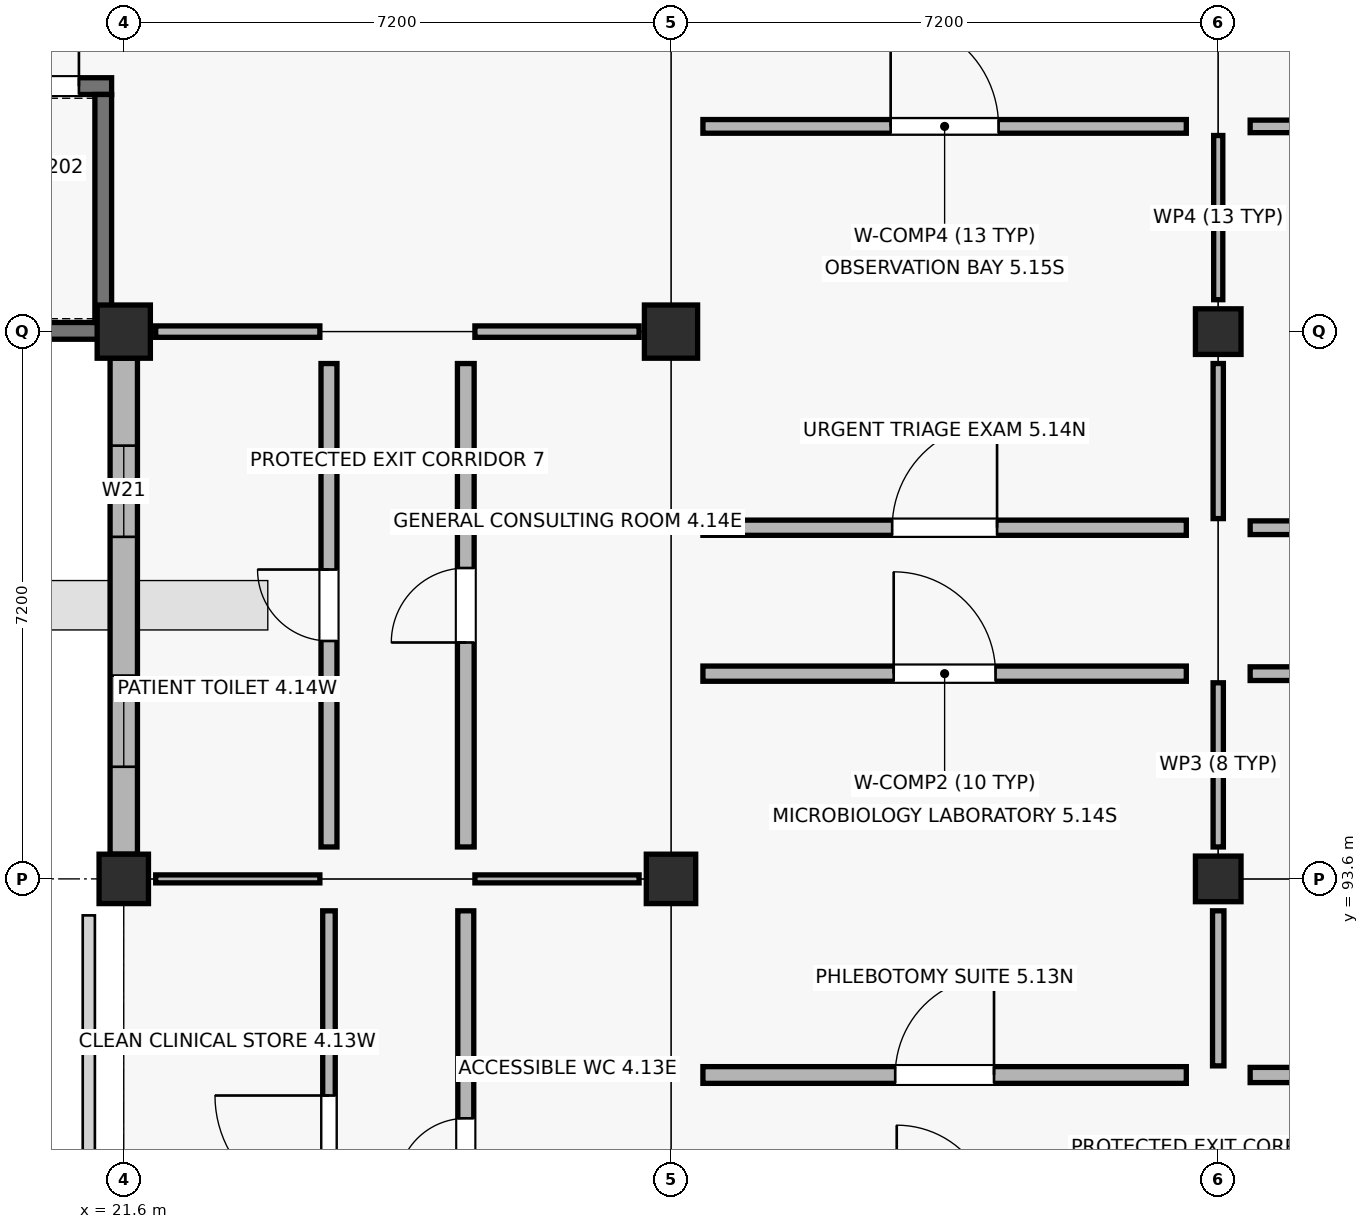
"""IFC4 building model, lengths in metres.
Left out: names, types, materials, properties, quantities, classifications, styles, units other than length and angle.
Written with IfcOpenShell. Run it as: python <this file> out.ifc"""

import sys

from ifc_helpers import new_model, si_unit, direction, frame, frame_2d, origin, origin_2d, place, context, subcontext, project, spatial, rectangle, extrude, element, fill, save


model = new_model("IFC4")
c1 = context("Model", 3, precision=1e-05, world=origin(), true_north=direction((0.0, 1.0)))
c2 = subcontext(c1, "Body", "Model", "MODEL_VIEW")
j1 = project(units=[si_unit("LENGTHUNIT", "METRE"), si_unit("PLANEANGLEUNIT", "RADIAN")], contexts=[c1])
p1 = place(None, origin())
s1 = spatial("IfcSite", under=j1, at=p1, CompositionType="ELEMENT")
p2 = place(p1, origin())
s2 = spatial("IfcBuilding", under=s1, at=p2, CompositionType="ELEMENT")
p3 = place(p2, origin())
s3 = spatial("IfcBuildingStorey", under=s2, at=p3, CompositionType="ELEMENT", Elevation=0.0)
p4 = place(p3, frame((21.6, 93.6, -0.25), z_axis=(0.0, 0.0, 1.0), x_axis=(1.0, 0.0, 0.0)))
e1 = element("IfcColumn", 1, at=p4, inside=s3, PredefinedType="COLUMN", context=c2, shape_type="SweptSolid", body=[
    extrude(rectangle(XDim=0.65, YDim=0.65, at=origin_2d()), origin(), (0.0, 0.0, 1.0), 4.75),
])
p5 = place(p3, frame((21.6, 100.8, -0.25), z_axis=(0.0, 0.0, 1.0), x_axis=(1.0, 0.0, 0.0)))
e2 = element("IfcColumn", 2, at=p5, inside=s3, PredefinedType="COLUMN", context=c2, shape_type="SweptSolid", body=[
    extrude(rectangle(XDim=0.7, YDim=0.7, at=origin_2d()), origin(), (0.0, 0.0, 1.0), 4.75),
])
p6 = place(p3, frame((28.8, 93.6, -0.25), z_axis=(0.0, 0.0, 1.0), x_axis=(1.0, 0.0, 0.0)))
e3 = element("IfcColumn", 3, at=p6, inside=s3, PredefinedType="COLUMN", context=c2, shape_type="SweptSolid", body=[
    extrude(rectangle(XDim=0.65, YDim=0.65, at=origin_2d()), origin(), (0.0, 0.0, 1.0), 4.75),
])
p7 = place(p3, frame((28.8, 100.8, -0.25), z_axis=(0.0, 0.0, 1.0), x_axis=(1.0, 0.0, 0.0)))
e4 = element("IfcColumn", 4, at=p7, inside=s3, PredefinedType="COLUMN", context=c2, shape_type="SweptSolid", body=[
    extrude(rectangle(XDim=0.7, YDim=0.7, at=origin_2d()), origin(), (0.0, 0.0, 1.0), 4.75),
])
for number, where, z_axis, x_axis in (
    (5, (36.0, 93.6, -0.25), (0.0, 0.0, 1.0), (1.0, 0.0, 0.0)),
    (6, (36.0, 100.8, -0.25), (0.0, 0.0, 1.0), (1.0, 0.0, 0.0)),
):
    element("IfcColumn", number, at=place(p3, frame(where, z_axis=z_axis, x_axis=x_axis)), inside=s3, PredefinedType="COLUMN", context=c2, shape_type="SweptSolid", body=[
        extrude(rectangle(XDim=0.6, YDim=0.6, at=origin_2d()), origin(), (0.0, 0.0, 1.0), 4.75),
    ])
p8 = place(p3, frame((21.6, 100.45, 0.0), z_axis=(0.0, 0.0, 1.0), x_axis=(0.0, -1.0, 0.0)))
e7 = element("IfcWall", 7, at=p8, inside=s3, PredefinedType="SOLIDWALL", context=c2, shape_type="SweptSolid", body=[
    extrude(rectangle(XDim=6.525, YDim=0.36, at=frame_2d((3.262, 0.0))), origin(), (0.0, 0.0, 1.0), 3.52),
])
p9 = place(p8, frame((1.15, 0.0, 0.9)))
e8 = element("IfcOpeningElement", 8, at=p9, cuts=e7, PredefinedType="OPENING", context=c2, shape_type="SweptSolid", body=[
    extrude(rectangle(XDim=1.2, YDim=1.5, at=frame_2d((0.6, 0.75))), frame((0.0, 0.19, 0.0), z_axis=(0.0, -1.0, 0.0), x_axis=(1.0, 0.0, 0.0)), (0.0, 0.0, 1.0), 0.38),
])
p10 = place(p8, frame((4.175, 0.0, 0.9)))
e9 = element("IfcOpeningElement", 9, at=p10, cuts=e7, PredefinedType="OPENING", context=c2, shape_type="SweptSolid", body=[
    extrude(rectangle(XDim=1.2, YDim=1.5, at=frame_2d((0.6, 0.75))), frame((0.0, 0.19, 0.0), z_axis=(0.0, -1.0, 0.0), x_axis=(1.0, 0.0, 0.0)), (0.0, 0.0, 1.0), 0.38),
])
p11 = place(p3, frame((14.56, 100.81, -0.25), z_axis=(0.0, 0.0, 1.0), x_axis=(1.0, 0.0, 0.0)))
e10 = element("IfcWall", 10, at=p11, inside=s3, PredefinedType="SHEAR", context=c2, shape_type="SweptSolid", body=[
    extrude(rectangle(XDim=6.88, YDim=0.22, at=frame_2d((3.44, 0.0))), origin(), (0.0, 0.0, 1.0), 4.47),
])
p12 = place(p3, frame((14.56, 104.03, -0.25), z_axis=(0.0, 0.0, 1.0), x_axis=(1.0, 0.0, 0.0)))
e11 = element("IfcWall", 11, at=p12, inside=s3, PredefinedType="SHEAR", context=c2, shape_type="SweptSolid", body=[
    extrude(rectangle(XDim=6.88, YDim=0.22, at=frame_2d((3.44, 0.0))), origin(), (0.0, 0.0, 1.0), 4.47),
])
p13 = place(p12, frame((5.25, 0.0, 0.25)))
e12 = element("IfcOpeningElement", 12, at=p13, cuts=e11, PredefinedType="OPENING", context=c2, shape_type="SweptSolid", body=[
    extrude(rectangle(XDim=1.2, YDim=2.15, at=frame_2d((0.6, 1.075))), frame((0.0, 0.12, 0.0), z_axis=(0.0, -1.0, 0.0), x_axis=(1.0, 0.0, 0.0)), (0.0, 0.0, 1.0), 0.24),
])
p14 = place(p3, frame((21.33, 100.92, -0.25), z_axis=(0.0, 0.0, 1.0), x_axis=(0.0, 1.0, 0.0)))
e13 = element("IfcWall", 13, at=p14, inside=s3, PredefinedType="SHEAR", context=c2, shape_type="SweptSolid", body=[
    extrude(rectangle(XDim=3.0, YDim=0.22, at=frame_2d((1.5, 0.0))), origin(), (0.0, 0.0, 1.0), 4.47),
])
p15 = place(p3, frame((29.22, 91.02, 0.0), z_axis=(0.0, 0.0, 1.0), x_axis=(1.0, 0.0, 0.0)))
e14 = element("IfcWall", 14, at=p15, inside=s3, PredefinedType="SOLIDWALL", context=c2, shape_type="SweptSolid", body=[
    extrude(rectangle(XDim=6.36, YDim=0.22, at=frame_2d((3.18, 0.0))), origin(), (0.0, 0.0, 1.0), 3.36),
])
p16 = place(p15, frame((2.53, 0.0, 0.0)))
e15 = element("IfcOpeningElement", 15, at=p16, cuts=e14, PredefinedType="OPENING", context=c2, shape_type="SweptSolid", body=[
    extrude(rectangle(XDim=1.3, YDim=2.09, at=frame_2d((0.65, 1.045))), frame((0.0, 0.12, 0.0), z_axis=(0.0, -1.0, 0.0), x_axis=(1.0, 0.0, 0.0)), (0.0, 0.0, 1.0), 0.24),
])
p17 = place(p3, frame((36.0, 91.14, 0.0), z_axis=(0.0, 0.0, 1.0), x_axis=(0.0, 1.0, 0.0)))
e16 = element("IfcWall", 16, at=p17, inside=s3, PredefinedType="PARTITIONING", context=c2, shape_type="SweptSolid", body=[
    extrude(rectangle(XDim=2.04, YDim=0.15, at=frame_2d((1.02, 0.0))), origin(), (0.0, 0.0, 1.0), 3.36),
])
p18 = place(p3, frame((29.22, 96.3, 0.0), z_axis=(0.0, 0.0, 1.0), x_axis=(1.0, 0.0, 0.0)))
e17 = element("IfcWall", 17, at=p18, inside=s3, PredefinedType="SOLIDWALL", context=c2, shape_type="SweptSolid", body=[
    extrude(rectangle(XDim=6.36, YDim=0.2, at=frame_2d((3.18, 0.0))), origin(), (0.0, 0.0, 1.0), 3.36),
])
p19 = place(p18, frame((2.51, 0.0, 0.0)))
e18 = element("IfcOpeningElement", 18, at=p19, cuts=e17, PredefinedType="OPENING", context=c2, shape_type="SweptSolid", body=[
    extrude(rectangle(XDim=1.34, YDim=2.09, at=frame_2d((0.67, 1.045))), frame((0.0, 0.11, 0.0), z_axis=(0.0, -1.0, 0.0), x_axis=(1.0, 0.0, 0.0)), (0.0, 0.0, 1.0), 0.22),
])
p20 = place(p3, frame((36.0, 94.02, 0.0), z_axis=(0.0, 0.0, 1.0), x_axis=(0.0, 1.0, 0.0)))
e19 = element("IfcWall", 19, at=p20, inside=s3, PredefinedType="PARTITIONING", context=c2, shape_type="SweptSolid", body=[
    extrude(rectangle(XDim=2.16, YDim=0.135, at=frame_2d((1.08, 0.0))), origin(), (0.0, 0.0, 1.0), 3.36),
])
p21 = place(p3, frame((29.22, 98.22, 0.0), z_axis=(0.0, 0.0, 1.0), x_axis=(1.0, 0.0, 0.0)))
e20 = element("IfcWall", 20, at=p21, inside=s3, PredefinedType="SOLIDWALL", context=c2, shape_type="SweptSolid", body=[
    extrude(rectangle(XDim=6.36, YDim=0.2, at=frame_2d((3.18, 0.0))), origin(), (0.0, 0.0, 1.0), 3.36),
])
p22 = place(p21, frame((2.49, 0.0, 0.0)))
e21 = element("IfcOpeningElement", 21, at=p22, cuts=e20, PredefinedType="OPENING", context=c2, shape_type="SweptSolid", body=[
    extrude(rectangle(XDim=1.38, YDim=2.09, at=frame_2d((0.69, 1.045))), frame((0.0, 0.11, 0.0), z_axis=(0.0, -1.0, 0.0), x_axis=(1.0, 0.0, 0.0)), (0.0, 0.0, 1.0), 0.22),
])
p23 = place(p3, frame((36.0, 98.34, 0.0), z_axis=(0.0, 0.0, 1.0), x_axis=(0.0, 1.0, 0.0)))
e22 = element("IfcWall", 22, at=p23, inside=s3, PredefinedType="PARTITIONING", context=c2, shape_type="SweptSolid", body=[
    extrude(rectangle(XDim=2.04, YDim=0.135, at=frame_2d((1.02, 0.0))), origin(), (0.0, 0.0, 1.0), 3.36),
])
p24 = place(p3, frame((29.22, 103.5, 0.0), z_axis=(0.0, 0.0, 1.0), x_axis=(1.0, 0.0, 0.0)))
e23 = element("IfcWall", 23, at=p24, inside=s3, PredefinedType="PARTITIONING", context=c2, shape_type="SweptSolid", body=[
    extrude(rectangle(XDim=6.36, YDim=0.18, at=frame_2d((3.18, 0.0))), origin(), (0.0, 0.0, 1.0), 3.36),
])
p25 = place(p24, frame((2.47, 0.0, 0.0)))
e24 = element("IfcOpeningElement", 24, at=p25, cuts=e23, PredefinedType="OPENING", context=c2, shape_type="SweptSolid", body=[
    extrude(rectangle(XDim=1.42, YDim=2.09, at=frame_2d((0.71, 1.045))), frame((0.0, 0.1, 0.0), z_axis=(0.0, -1.0, 0.0), x_axis=(1.0, 0.0, 0.0)), (0.0, 0.0, 1.0), 0.2),
])
p26 = place(p3, frame((36.0, 101.22, 0.0), z_axis=(0.0, 0.0, 1.0), x_axis=(0.0, 1.0, 0.0)))
e25 = element("IfcWall", 25, at=p26, inside=s3, PredefinedType="PARTITIONING", context=c2, shape_type="SweptSolid", body=[
    extrude(rectangle(XDim=2.16, YDim=0.12, at=frame_2d((1.08, 0.0))), origin(), (0.0, 0.0, 1.0), 3.36),
])
p27 = place(p3, frame((36.42, 91.02, 0.0), z_axis=(0.0, 0.0, 1.0), x_axis=(1.0, 0.0, 0.0)))
e26 = element("IfcWall", 26, at=p27, inside=s3, PredefinedType="SOLIDWALL", context=c2, shape_type="SweptSolid", body=[
    extrude(rectangle(XDim=6.36, YDim=0.2, at=frame_2d((3.18, 0.0))), origin(), (0.0, 0.0, 1.0), 3.36),
])
p28 = place(p27, frame((2.69, 0.0, 0.0)))
e27 = element("IfcOpeningElement", 27, at=p28, cuts=e26, PredefinedType="OPENING", context=c2, shape_type="SweptSolid", body=[
    extrude(rectangle(XDim=0.98, YDim=2.14, at=frame_2d((0.49, 1.07))), frame((0.0, 0.11, 0.0), z_axis=(0.0, -1.0, 0.0), x_axis=(1.0, 0.0, 0.0)), (0.0, 0.0, 1.0), 0.22),
])
p29 = place(p3, frame((36.42, 96.3, 0.0), z_axis=(0.0, 0.0, 1.0), x_axis=(1.0, 0.0, 0.0)))
e28 = element("IfcWall", 28, at=p29, inside=s3, PredefinedType="PARTITIONING", context=c2, shape_type="SweptSolid", body=[
    extrude(rectangle(XDim=6.36, YDim=0.18, at=frame_2d((3.18, 0.0))), origin(), (0.0, 0.0, 1.0), 3.36),
])
p30 = place(p29, frame((2.67, 0.0, 0.0)))
e29 = element("IfcOpeningElement", 29, at=p30, cuts=e28, PredefinedType="OPENING", context=c2, shape_type="SweptSolid", body=[
    extrude(rectangle(XDim=1.02, YDim=2.14, at=frame_2d((0.51, 1.07))), frame((0.0, 0.1, 0.0), z_axis=(0.0, -1.0, 0.0), x_axis=(1.0, 0.0, 0.0)), (0.0, 0.0, 1.0), 0.2),
])
p31 = place(p3, frame((36.42, 98.22, 0.0), z_axis=(0.0, 0.0, 1.0), x_axis=(1.0, 0.0, 0.0)))
e30 = element("IfcWall", 30, at=p31, inside=s3, PredefinedType="PARTITIONING", context=c2, shape_type="SweptSolid", body=[
    extrude(rectangle(XDim=6.36, YDim=0.18, at=frame_2d((3.18, 0.0))), origin(), (0.0, 0.0, 1.0), 3.36),
])
p32 = place(p31, frame((2.65, 0.0, 0.0)))
e31 = element("IfcOpeningElement", 31, at=p32, cuts=e30, PredefinedType="OPENING", context=c2, shape_type="SweptSolid", body=[
    extrude(rectangle(XDim=1.06, YDim=2.14, at=frame_2d((0.53, 1.07))), frame((0.0, 0.1, 0.0), z_axis=(0.0, -1.0, 0.0), x_axis=(1.0, 0.0, 0.0)), (0.0, 0.0, 1.0), 0.2),
])
p33 = place(p3, frame((36.42, 103.5, 0.0), z_axis=(0.0, 0.0, 1.0), x_axis=(1.0, 0.0, 0.0)))
e32 = element("IfcWall", 32, at=p33, inside=s3, PredefinedType="PARTITIONING", context=c2, shape_type="SweptSolid", body=[
    extrude(rectangle(XDim=6.36, YDim=0.165, at=frame_2d((3.18, 0.0))), origin(), (0.0, 0.0, 1.0), 3.36),
])
p34 = place(p33, frame((2.63, 0.0, 0.0)))
e33 = element("IfcOpeningElement", 33, at=p34, cuts=e32, PredefinedType="OPENING", context=c2, shape_type="SweptSolid", body=[
    extrude(rectangle(XDim=1.1, YDim=2.14, at=frame_2d((0.55, 1.07))), frame((0.0, 0.093, 0.0), z_axis=(0.0, -1.0, 0.0), x_axis=(1.0, 0.0, 0.0)), (0.0, 0.0, 1.0), 0.185),
])
p35 = place(p3, frame((24.3, 86.82, 0.0), z_axis=(0.0, 0.0, 1.0), x_axis=(0.0, 1.0, 0.0)))
e34 = element("IfcWall", 34, at=p35, inside=s3, PredefinedType="PARTITIONING", context=c2, shape_type="SweptSolid", body=[
    extrude(rectangle(XDim=6.36, YDim=0.165, at=frame_2d((3.18, 0.0))), origin(), (0.0, 0.0, 1.0), 3.36),
])
p36 = place(p35, frame((2.43, 0.0, 0.0)))
e35 = element("IfcOpeningElement", 35, at=p36, cuts=e34, PredefinedType="OPENING", context=c2, shape_type="SweptSolid", body=[
    extrude(rectangle(XDim=1.5, YDim=2.09, at=frame_2d((0.75, 1.045))), frame((0.0, 0.093, 0.0), z_axis=(0.0, -1.0, 0.0), x_axis=(1.0, 0.0, 0.0)), (0.0, 0.0, 1.0), 0.185),
])
p37 = place(p3, frame((22.02, 93.6, 0.0), z_axis=(0.0, 0.0, 1.0), x_axis=(1.0, 0.0, 0.0)))
e36 = element("IfcWall", 36, at=p37, inside=s3, PredefinedType="PARTITIONING", context=c2, shape_type="SweptSolid", body=[
    extrude(rectangle(XDim=2.16, YDim=0.105, at=frame_2d((1.08, 0.0))), origin(), (0.0, 0.0, 1.0), 3.36),
])
p38 = place(p3, frame((26.1, 86.82, 0.0), z_axis=(0.0, 0.0, 1.0), x_axis=(0.0, 1.0, 0.0)))
e37 = element("IfcWall", 37, at=p38, inside=s3, PredefinedType="PLUMBINGWALL", context=c2, shape_type="SweptSolid", body=[
    extrude(rectangle(XDim=6.36, YDim=0.21, at=frame_2d((3.18, 0.0))), origin(), (0.0, 0.0, 1.0), 3.36),
])
p39 = place(p38, frame((2.73, 0.0, 0.0)))
e38 = element("IfcOpeningElement", 38, at=p39, cuts=e37, PredefinedType="OPENING", context=c2, shape_type="SweptSolid", body=[
    extrude(rectangle(XDim=0.9, YDim=2.14, at=frame_2d((0.45, 1.07))), frame((0.0, 0.115, 0.0), z_axis=(0.0, -1.0, 0.0), x_axis=(1.0, 0.0, 0.0)), (0.0, 0.0, 1.0), 0.23),
])
p40 = place(p3, frame((26.22, 93.6, 0.0), z_axis=(0.0, 0.0, 1.0), x_axis=(1.0, 0.0, 0.0)))
e39 = element("IfcWall", 39, at=p40, inside=s3, PredefinedType="PARTITIONING", context=c2, shape_type="SweptSolid", body=[
    extrude(rectangle(XDim=2.16, YDim=0.105, at=frame_2d((1.08, 0.0))), origin(), (0.0, 0.0, 1.0), 3.36),
])
p41 = place(p3, frame((24.3, 94.02, 0.0), z_axis=(0.0, 0.0, 1.0), x_axis=(0.0, 1.0, 0.0)))
e40 = element("IfcWall", 40, at=p41, inside=s3, PredefinedType="PLUMBINGWALL", context=c2, shape_type="SweptSolid", body=[
    extrude(rectangle(XDim=6.36, YDim=0.21, at=frame_2d((3.18, 0.0))), origin(), (0.0, 0.0, 1.0), 3.36),
])
p42 = place(p41, frame((2.71, 0.0, 0.0)))
e41 = element("IfcOpeningElement", 41, at=p42, cuts=e40, PredefinedType="OPENING", context=c2, shape_type="SweptSolid", body=[
    extrude(rectangle(XDim=0.94, YDim=2.14, at=frame_2d((0.47, 1.07))), frame((0.0, 0.115, 0.0), z_axis=(0.0, -1.0, 0.0), x_axis=(1.0, 0.0, 0.0)), (0.0, 0.0, 1.0), 0.23),
])
p43 = place(p3, frame((22.02, 100.8, 0.0), z_axis=(0.0, 0.0, 1.0), x_axis=(1.0, 0.0, 0.0)))
e42 = element("IfcWall", 42, at=p43, inside=s3, PredefinedType="PARTITIONING", context=c2, shape_type="SweptSolid", body=[
    extrude(rectangle(XDim=2.16, YDim=0.15, at=frame_2d((1.08, 0.0))), origin(), (0.0, 0.0, 1.0), 3.36),
])
p44 = place(p3, frame((26.1, 94.02, 0.0), z_axis=(0.0, 0.0, 1.0), x_axis=(0.0, 1.0, 0.0)))
e43 = element("IfcWall", 43, at=p44, inside=s3, PredefinedType="SOLIDWALL", context=c2, shape_type="SweptSolid", body=[
    extrude(rectangle(XDim=6.36, YDim=0.22, at=frame_2d((3.18, 0.0))), origin(), (0.0, 0.0, 1.0), 3.36),
])
p45 = place(p44, frame((2.69, 0.0, 0.0)))
e44 = element("IfcOpeningElement", 44, at=p45, cuts=e43, PredefinedType="OPENING", context=c2, shape_type="SweptSolid", body=[
    extrude(rectangle(XDim=0.98, YDim=2.14, at=frame_2d((0.49, 1.07))), frame((0.0, 0.12, 0.0), z_axis=(0.0, -1.0, 0.0), x_axis=(1.0, 0.0, 0.0)), (0.0, 0.0, 1.0), 0.24),
])
p46 = place(p3, frame((26.22, 100.8, 0.0), z_axis=(0.0, 0.0, 1.0), x_axis=(1.0, 0.0, 0.0)))
e45 = element("IfcWall", 45, at=p46, inside=s3, PredefinedType="PARTITIONING", context=c2, shape_type="SweptSolid", body=[
    extrude(rectangle(XDim=2.16, YDim=0.15, at=frame_2d((1.08, 0.0))), origin(), (0.0, 0.0, 1.0), 3.36),
])
p47 = place(p9, origin())
e46 = element("IfcWindow", 46, at=p47, inside=s3, PartitioningType="SINGLE_PANEL", PredefinedType="WINDOW", context=c2, shape_type="SweptSolid", body=[
    extrude(rectangle(XDim=1.2, YDim=1.5, at=frame_2d((0.6, 0.75))), frame((0.0, 0.03, 0.0), z_axis=(0.0, -1.0, 0.0), x_axis=(1.0, 0.0, 0.0)), (0.0, 0.0, 1.0), 0.06),
])
fill(e8, e46)
p48 = place(p10, origin())
e47 = element("IfcWindow", 47, at=p48, inside=s3, PartitioningType="SINGLE_PANEL", PredefinedType="WINDOW", context=c2, shape_type="SweptSolid", body=[
    extrude(rectangle(XDim=1.2, YDim=1.5, at=frame_2d((0.6, 0.75))), frame((0.0, 0.03, 0.0), z_axis=(0.0, -1.0, 0.0), x_axis=(1.0, 0.0, 0.0)), (0.0, 0.0, 1.0), 0.06),
])
fill(e9, e47)
p49 = place(p13, origin())
e48 = element("IfcDoor", 48, at=p49, inside=s3, OperationType="SINGLE_SWING_RIGHT", PredefinedType="DOOR", context=c2, shape_type="SweptSolid", body=[
    extrude(rectangle(XDim=1.2, YDim=2.15, at=frame_2d((0.6, 1.075))), frame((0.0, 0.025, 0.0), z_axis=(0.0, -1.0, 0.0), x_axis=(1.0, 0.0, 0.0)), (0.0, 0.0, 1.0), 0.05),
])
fill(e12, e48)
p50 = place(p16, origin())
e49 = element("IfcDoor", 49, at=p50, inside=s3, OperationType="SINGLE_SWING_RIGHT", PredefinedType="DOOR", context=c2, shape_type="SweptSolid", body=[
    extrude(rectangle(XDim=1.3, YDim=2.09, at=frame_2d((0.65, 1.045))), frame((0.0, 0.025, 0.0), z_axis=(0.0, -1.0, 0.0), x_axis=(1.0, 0.0, 0.0)), (0.0, 0.0, 1.0), 0.05),
])
fill(e15, e49)
p51 = place(p19, origin())
e50 = element("IfcDoor", 50, at=p51, inside=s3, OperationType="SINGLE_SWING_LEFT", PredefinedType="DOOR", context=c2, shape_type="SweptSolid", body=[
    extrude(rectangle(XDim=1.34, YDim=2.09, at=frame_2d((0.67, 1.045))), frame((0.0, 0.025, 0.0), z_axis=(0.0, -1.0, 0.0), x_axis=(1.0, 0.0, 0.0)), (0.0, 0.0, 1.0), 0.05),
])
fill(e18, e50)
p52 = place(p22, origin())
e51 = element("IfcDoor", 51, at=p52, inside=s3, OperationType="SINGLE_SWING_RIGHT", PredefinedType="DOOR", context=c2, shape_type="SweptSolid", body=[
    extrude(rectangle(XDim=1.38, YDim=2.09, at=frame_2d((0.69, 1.045))), frame((0.0, 0.025, 0.0), z_axis=(0.0, -1.0, 0.0), x_axis=(1.0, 0.0, 0.0)), (0.0, 0.0, 1.0), 0.05),
])
fill(e21, e51)
p53 = place(p25, origin())
e52 = element("IfcDoor", 52, at=p53, inside=s3, OperationType="SINGLE_SWING_LEFT", PredefinedType="DOOR", context=c2, shape_type="SweptSolid", body=[
    extrude(rectangle(XDim=1.42, YDim=2.09, at=frame_2d((0.71, 1.045))), frame((0.0, 0.025, 0.0), z_axis=(0.0, -1.0, 0.0), x_axis=(1.0, 0.0, 0.0)), (0.0, 0.0, 1.0), 0.05),
])
fill(e24, e52)
p54 = place(p36, origin())
e53 = element("IfcDoor", 53, at=p54, inside=s3, OperationType="SINGLE_SWING_RIGHT", PredefinedType="DOOR", context=c2, shape_type="SweptSolid", body=[
    extrude(rectangle(XDim=1.5, YDim=2.09, at=frame_2d((0.75, 1.045))), frame((0.0, 0.025, 0.0), z_axis=(0.0, -1.0, 0.0), x_axis=(1.0, 0.0, 0.0)), (0.0, 0.0, 1.0), 0.05),
])
fill(e35, e53)
p55 = place(p39, origin())
e54 = element("IfcDoor", 54, at=p55, inside=s3, OperationType="SINGLE_SWING_LEFT", PredefinedType="DOOR", context=c2, shape_type="SweptSolid", body=[
    extrude(rectangle(XDim=0.9, YDim=2.14, at=frame_2d((0.45, 1.07))), frame((0.0, 0.025, 0.0), z_axis=(0.0, -1.0, 0.0), x_axis=(1.0, 0.0, 0.0)), (0.0, 0.0, 1.0), 0.05),
])
fill(e38, e54)
p56 = place(p42, origin())
e55 = element("IfcDoor", 55, at=p56, inside=s3, OperationType="SINGLE_SWING_RIGHT", PredefinedType="DOOR", context=c2, shape_type="SweptSolid", body=[
    extrude(rectangle(XDim=0.94, YDim=2.14, at=frame_2d((0.47, 1.07))), frame((0.0, 0.025, 0.0), z_axis=(0.0, -1.0, 0.0), x_axis=(1.0, 0.0, 0.0)), (0.0, 0.0, 1.0), 0.05),
])
fill(e41, e55)
p57 = place(p45, origin())
e56 = element("IfcDoor", 56, at=p57, inside=s3, OperationType="SINGLE_SWING_LEFT", PredefinedType="DOOR", context=c2, shape_type="SweptSolid", body=[
    extrude(rectangle(XDim=0.98, YDim=2.14, at=frame_2d((0.49, 1.07))), frame((0.0, 0.025, 0.0), z_axis=(0.0, -1.0, 0.0), x_axis=(1.0, 0.0, 0.0)), (0.0, 0.0, 1.0), 0.05),
])
fill(e44, e56)
save(model, sys.argv[1])
